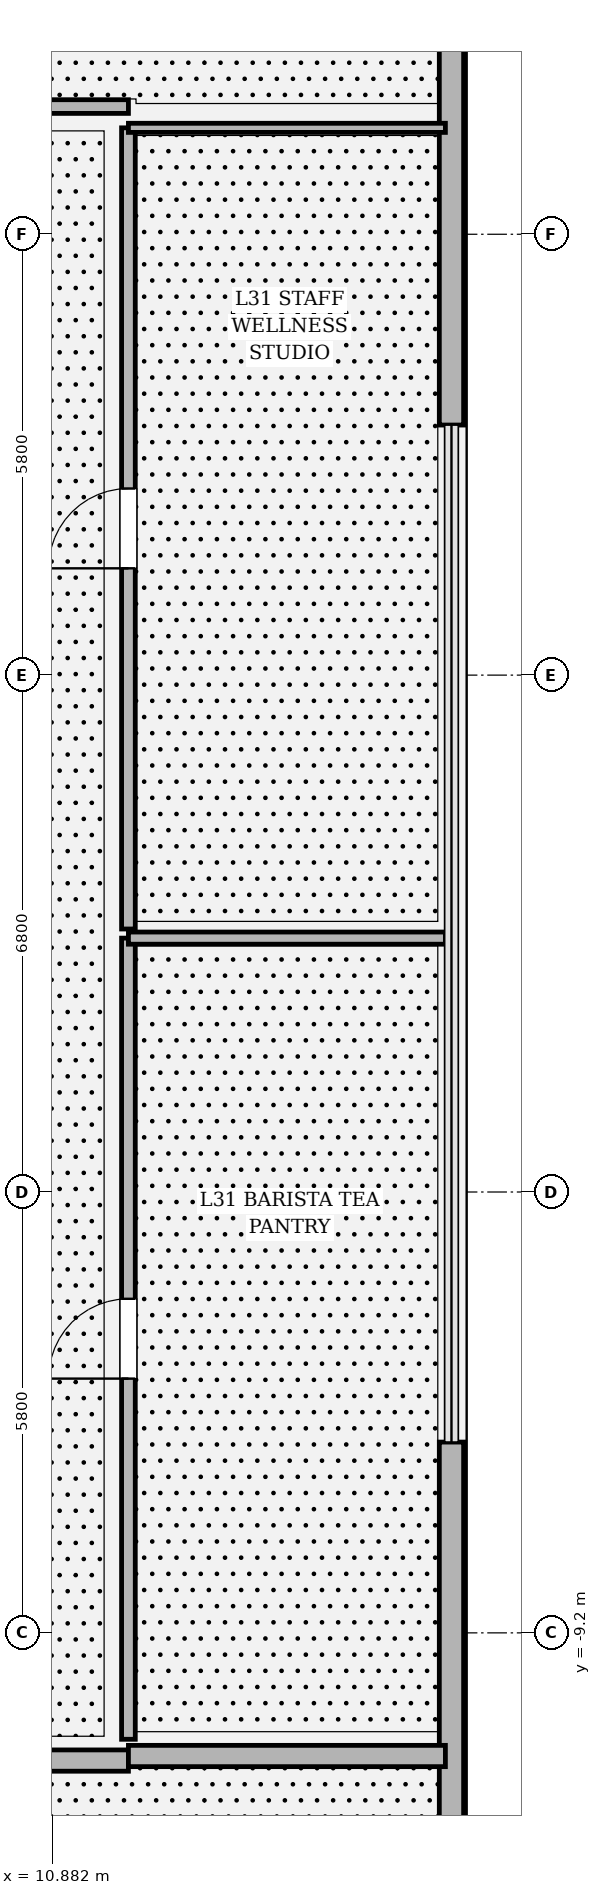
"""IFC4 building model, lengths in metres.
Left out: names, types, materials, properties, quantities, classifications, styles, units other than length and angle.
Written with IfcOpenShell. Run it as: python <this file> out.ifc"""

import sys

from ifc_helpers import new_model, si_unit, direction, frame, frame_2d, origin, place, context, subcontext, project, spatial, rectangle, extrude, element, fill, save


model = new_model("IFC4")
c1 = context("Model", 3, precision=1e-05, world=origin(), true_north=direction((0.0, 1.0)))
c2 = subcontext(c1, "Body", "Model", "MODEL_VIEW")
j1 = project(units=[si_unit("LENGTHUNIT", "METRE"), si_unit("PLANEANGLEUNIT", "RADIAN")], contexts=[c1])
p1 = place(None, origin())
s1 = spatial("IfcSite", under=j1, at=p1, CompositionType="ELEMENT")
p2 = place(p1, origin())
s2 = spatial("IfcBuilding", under=s1, at=p2, CompositionType="ELEMENT")
p3 = place(p2, frame((0.0, 0.0, 135.0)))
s3 = spatial("IfcBuildingStorey", under=s2, at=p3, CompositionType="ELEMENT", Elevation=135.0)
for number, where, z_axis, x_axis in (
    (1, (16.13, -13.727, 0.0), (0.0, 0.0, 1.0), (0.0, 1.0, 0.0)),
    (2, (16.13, 6.69, 0.0), (0.0, 0.0, 1.0), (0.0, 1.0, 0.0)),
):
    element("IfcWall", number, at=place(p3, frame(where, z_axis=z_axis, x_axis=x_axis)), inside=s3, PredefinedType="SOLIDWALL", context=c2, shape_type="SweptSolid", body=[
        extrude(rectangle(XDim=7.037, YDim=0.32, at=frame_2d((3.519, 0.0))), origin(), (0.0, 0.0, 1.0), 3.194),
    ])
p4 = place(p3, frame((-1.286, -10.88, 0.0), z_axis=(0.0, 0.0, 1.0), x_axis=(1.0, 0.0, 0.0)))
e3 = element("IfcWall", 3, at=p4, inside=s3, PredefinedType="SOLIDWALL", context=c2, shape_type="SweptSolid", body=[
    extrude(rectangle(XDim=13.166, YDim=0.28, at=frame_2d((6.583, 0.0))), origin(), (0.0, 0.0, 1.0), 3.194),
])
p5 = place(p4, frame((5.733, 0.0, 0.0)))
e4 = element("IfcOpeningElement", 4, at=p5, cuts=e3, PredefinedType="OPENING", context=c2, shape_type="SweptSolid", body=[
    extrude(rectangle(XDim=1.7, YDim=2.3, at=frame_2d((0.85, 1.15))), frame((0.0, 0.15, 0.0), z_axis=(0.0, -1.0, 0.0), x_axis=(1.0, 0.0, 0.0)), (0.0, 0.0, 1.0), 0.3),
])
p6 = place(p3, frame((11.88, -10.82, 0.0), z_axis=(0.0, 0.0, 1.0), x_axis=(1.0, 0.0, 0.0)))
e5 = element("IfcWall", 5, at=p6, inside=s3, PredefinedType="SOLIDWALL", context=c2, shape_type="SweptSolid", body=[
    extrude(rectangle(XDim=4.17, YDim=0.28, at=frame_2d((2.085, 0.0))), origin(), (0.0, 0.0, 1.0), 4.114),
])
p7 = place(p3, frame((11.88, -10.6, 0.0), z_axis=(0.0, 0.0, 1.0), x_axis=(0.0, 1.0, 0.0)))
e6 = element("IfcWall", 6, at=p7, inside=s3, PredefinedType="PARTITIONING", context=c2, shape_type="SweptSolid", body=[
    extrude(rectangle(XDim=10.54, YDim=0.18, at=frame_2d((5.27, 0.0))), origin(), (0.0, 0.0, 1.0), 3.194),
])
p8 = place(p7, frame((4.745, 0.0, 0.0)))
e7 = element("IfcOpeningElement", 7, at=p8, cuts=e6, PredefinedType="OPENING", context=c2, shape_type="SweptSolid", body=[
    extrude(rectangle(XDim=1.05, YDim=2.2, at=frame_2d((0.525, 1.1))), frame((0.0, 0.1, 0.0), z_axis=(0.0, -1.0, 0.0), x_axis=(1.0, 0.0, 0.0)), (0.0, 0.0, 1.0), 0.2),
])
p9 = place(p3, frame((11.88, -0.06, 0.0), z_axis=(0.0, 0.0, 1.0), x_axis=(1.0, 0.0, 0.0)))
e8 = element("IfcWall", 8, at=p9, inside=s3, PredefinedType="PARTITIONING", context=c2, shape_type="SweptSolid", body=[
    extrude(rectangle(XDim=4.17, YDim=0.16, at=frame_2d((2.085, 0.0))), origin(), (0.0, 0.0, 1.0), 4.52),
])
p10 = place(p3, frame((11.88, 0.06, 0.0), z_axis=(0.0, 0.0, 1.0), x_axis=(0.0, 1.0, 0.0)))
e9 = element("IfcWall", 9, at=p10, inside=s3, PredefinedType="PARTITIONING", context=c2, shape_type="SweptSolid", body=[
    extrude(rectangle(XDim=10.54, YDim=0.18, at=frame_2d((5.27, 0.0))), origin(), (0.0, 0.0, 1.0), 3.194),
])
p11 = place(p10, frame((4.745, 0.0, 0.0)))
e10 = element("IfcOpeningElement", 10, at=p11, cuts=e9, PredefinedType="OPENING", context=c2, shape_type="SweptSolid", body=[
    extrude(rectangle(XDim=1.05, YDim=2.2, at=frame_2d((0.525, 1.1))), frame((0.0, 0.1, 0.0), z_axis=(0.0, -1.0, 0.0), x_axis=(1.0, 0.0, 0.0)), (0.0, 0.0, 1.0), 0.2),
])
p12 = place(p3, frame((11.88, 10.6, 0.0), z_axis=(0.0, 0.0, 1.0), x_axis=(1.0, 0.0, 0.0)))
e11 = element("IfcWall", 11, at=p12, inside=s3, PredefinedType="PARTITIONING", context=c2, shape_type="SweptSolid", body=[
    extrude(rectangle(XDim=4.17, YDim=0.12, at=frame_2d((2.085, 0.0))), origin(), (0.0, 0.0, 1.0), 4.114),
])
p13 = place(p3, frame((11.88, 10.88, 0.0), z_axis=(0.0, 0.0, 1.0), x_axis=(-1.0, 0.0, 0.0)))
e12 = element("IfcWall", 12, at=p13, inside=s3, PredefinedType="PARTITIONING", context=c2, shape_type="SweptSolid", body=[
    extrude(rectangle(XDim=13.166, YDim=0.18, at=frame_2d((6.583, 0.0))), origin(), (0.0, 0.0, 1.0), 3.194),
])
p14 = place(p13, frame((6.058, 0.0, 0.0)))
e13 = element("IfcOpeningElement", 13, at=p14, cuts=e12, PredefinedType="OPENING", context=c2, shape_type="SweptSolid", body=[
    extrude(rectangle(XDim=1.05, YDim=2.2, at=frame_2d((0.525, 1.1))), frame((0.0, 0.1, 0.0), z_axis=(0.0, -1.0, 0.0), x_axis=(1.0, 0.0, 0.0)), (0.0, 0.0, 1.0), 0.2),
])
p15 = place(p8, origin())
e14 = element("IfcDoor", 14, at=p15, inside=s3, OperationType="SINGLE_SWING_LEFT", PredefinedType="DOOR", context=c2, shape_type="SweptSolid", body=[
    extrude(rectangle(XDim=1.05, YDim=2.2, at=frame_2d((0.525, 1.1))), frame((0.0, 0.025, 0.0), z_axis=(0.0, -1.0, 0.0), x_axis=(1.0, 0.0, 0.0)), (0.0, 0.0, 1.0), 0.05),
])
fill(e7, e14)
p16 = place(p11, origin())
e15 = element("IfcDoor", 15, at=p16, inside=s3, OperationType="SINGLE_SWING_LEFT", PredefinedType="DOOR", context=c2, shape_type="SweptSolid", body=[
    extrude(rectangle(XDim=1.05, YDim=2.2, at=frame_2d((0.525, 1.1))), frame((0.0, 0.025, 0.0), z_axis=(0.0, -1.0, 0.0), x_axis=(1.0, 0.0, 0.0)), (0.0, 0.0, 1.0), 0.05),
])
fill(e10, e15)
save(model, sys.argv[1])
